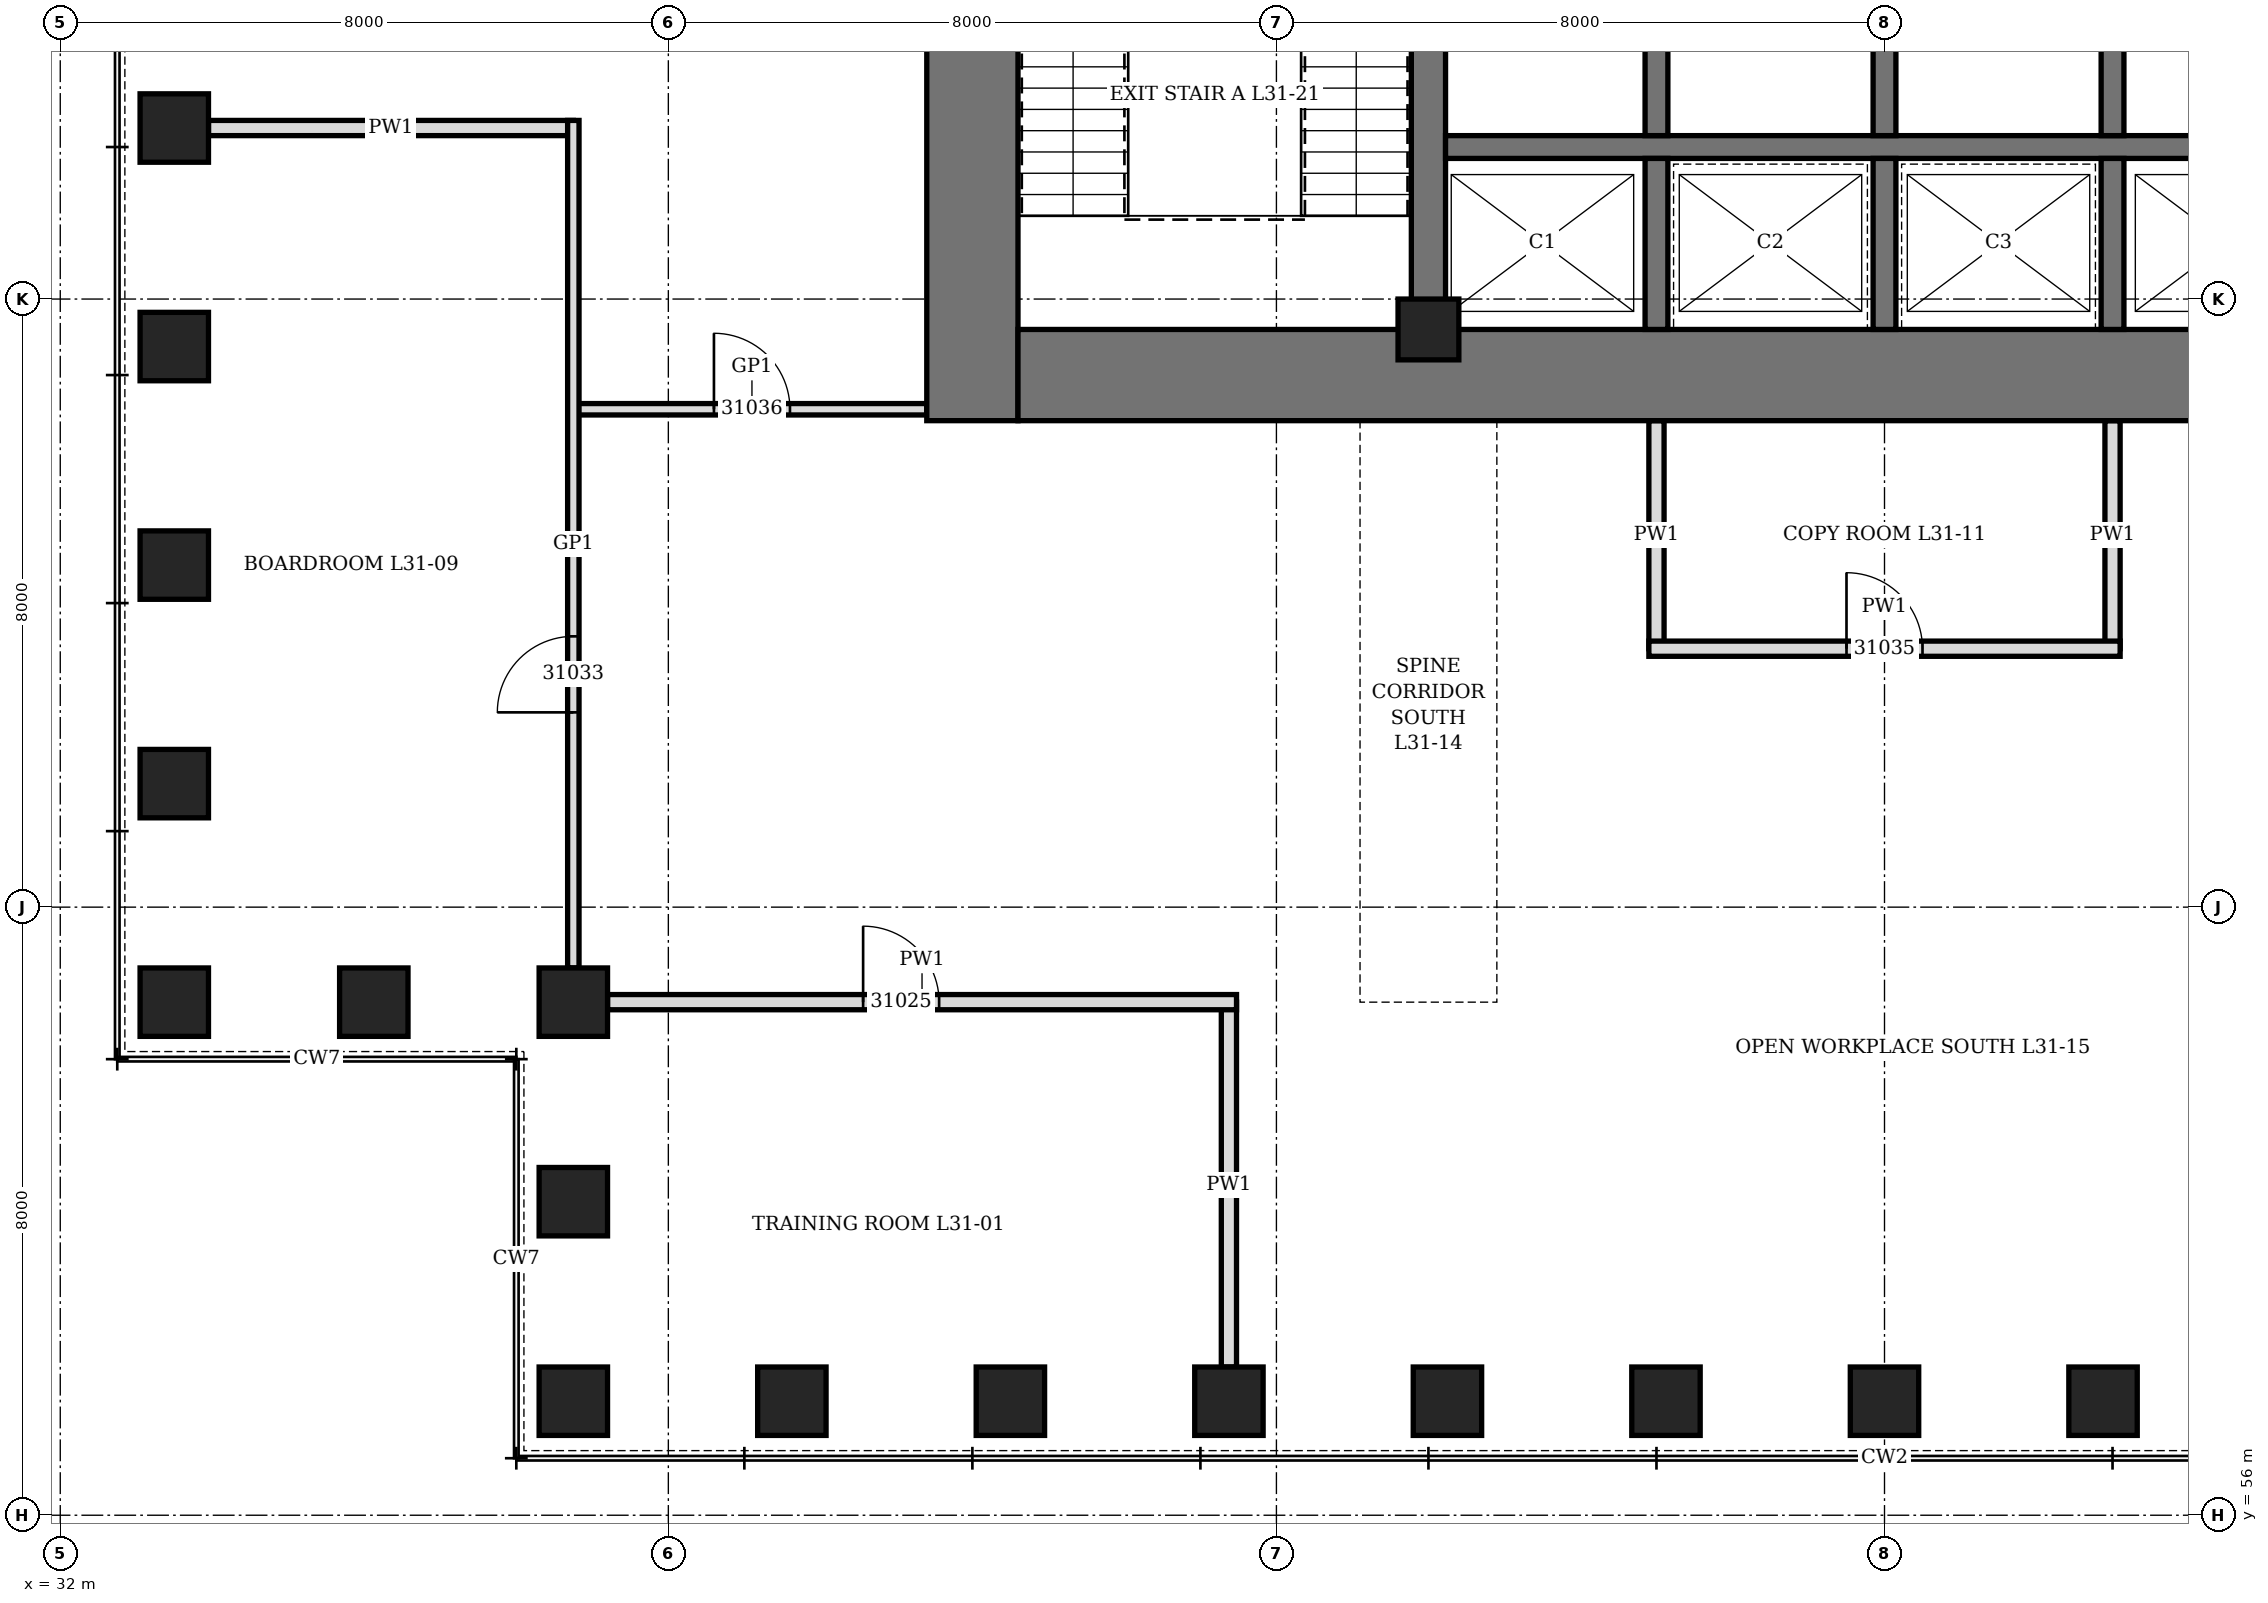
"""IFC4 building model, lengths in metres.
Left out: names, types, materials, properties, quantities, classifications, styles, units other than length and angle.
Written with IfcOpenShell. Run it as: python <this file> out.ifc"""

import sys

from ifc_helpers import new_model, si_unit, direction, frame, frame_2d, origin, origin_2d, place, context, subcontext, project, spatial, rectangle, hollow_rectangle, extrude, element, fill, save


model = new_model("IFC4")
c1 = context("Model", 3, precision=1e-05, world=origin(), true_north=direction((0.0, 1.0)))
c2 = subcontext(c1, "Body", "Model", "MODEL_VIEW")
j1 = project(units=[si_unit("LENGTHUNIT", "METRE"), si_unit("PLANEANGLEUNIT", "RADIAN")], contexts=[c1])
p1 = place(None, origin())
s1 = spatial("IfcSite", under=j1, at=p1, CompositionType="ELEMENT")
p2 = place(p1, origin())
s2 = spatial("IfcBuilding", under=s1, at=p2, CompositionType="ELEMENT")
p3 = place(p2, frame((0.0, 0.0, 141.7)))
s3 = spatial("IfcBuildingStorey", under=s2, at=p3, CompositionType="ELEMENT", Elevation=141.7)
for number, where, z_axis, x_axis in (
    (1, (38.75, 57.5, 0.0), (0.0, 0.0, 1.0), (1.0, 0.0, 0.0)),
    (2, (41.625, 57.5, 0.0), (0.0, 0.0, 1.0), (1.0, 0.0, 0.0)),
    (3, (44.5, 57.5, 0.0), (0.0, 0.0, 1.0), (1.0, 0.0, 0.0)),
    (4, (47.375, 57.5, 0.0), (0.0, 0.0, 1.0), (1.0, 0.0, 0.0)),
    (5, (50.25, 57.5, 0.0), (0.0, 0.0, 1.0), (1.0, 0.0, 0.0)),
    (6, (53.125, 57.5, 0.0), (0.0, 0.0, 1.0), (1.0, 0.0, 0.0)),
    (7, (56.0, 57.5, 0.0), (0.0, 0.0, 1.0), (1.0, 0.0, 0.0)),
    (8, (58.875, 57.5, 0.0), (0.0, 0.0, 1.0), (1.0, 0.0, 0.0)),
    (9, (33.5, 74.25, 0.0), (0.0, 0.0, 1.0), (0.0, 1.0, 0.0)),
    (10, (33.5, 71.375, 0.0), (0.0, 0.0, 1.0), (0.0, 1.0, 0.0)),
    (11, (33.5, 68.5, 0.0), (0.0, 0.0, 1.0), (0.0, 1.0, 0.0)),
    (12, (33.5, 65.625, 0.0), (0.0, 0.0, 1.0), (0.0, 1.0, 0.0)),
    (13, (33.5, 62.75, 0.0), (0.0, 0.0, 1.0), (1.0, 0.0, 0.0)),
    (14, (36.125, 62.75, 0.0), (0.0, 0.0, 1.0), (1.0, 0.0, 0.0)),
    (15, (38.75, 62.75, 0.0), (0.0, 0.0, 1.0), (0.0, 1.0, 0.0)),
    (16, (38.75, 60.125, 0.0), (0.0, 0.0, 1.0), (0.0, 1.0, 0.0)),
):
    element("IfcColumn", number, at=place(p3, frame(where, z_axis=z_axis, x_axis=x_axis)), inside=s3, PredefinedType="COLUMN", context=c2, shape_type="SweptSolid", body=[
        extrude(hollow_rectangle(XDim=0.9, YDim=0.9, WallThickness=0.12, at=origin_2d()), origin(), (0.0, 0.0, 1.0), 4.2),
    ])
p4 = place(p3, frame((44.0, 70.4, 0.0), z_axis=(0.0, 0.0, 1.0), x_axis=(0.0, 1.0, 0.0)))
e17 = element("IfcWall", 17, at=p4, inside=s3, PredefinedType="SHEAR", context=c2, shape_type="SweptSolid", body=[
    extrude(rectangle(XDim=19.2, YDim=1.2, at=frame_2d((9.6, 0.0))), origin(), (0.0, 0.0, 1.0), 4.2),
])
p5 = place(p4, frame((8.6, 0.0, 0.0)))
e18 = element("IfcOpeningElement", 18, at=p5, cuts=e17, PredefinedType="OPENING", context=c2, shape_type="SweptSolid", body=[
    extrude(rectangle(XDim=2.0, YDim=2.4, at=frame_2d((1.0, 1.2))), frame((0.0, 0.61, 0.0), z_axis=(0.0, -1.0, 0.0), x_axis=(1.0, 0.0, 0.0)), (0.0, 0.0, 1.0), 1.22),
])
p6 = place(p3, frame((44.6, 71.0, 0.0), z_axis=(0.0, 0.0, 1.0), x_axis=(1.0, 0.0, 0.0)))
e19 = element("IfcWall", 19, at=p6, inside=s3, PredefinedType="SHEAR", context=c2, shape_type="SweptSolid", body=[
    extrude(rectangle(XDim=22.8, YDim=1.2, at=frame_2d((11.4, 0.0))), origin(), (0.0, 0.0, 1.0), 4.2),
])
p7 = place(p3, frame((50.0, 71.6, 0.0), z_axis=(0.0, 0.0, 1.0), x_axis=(0.0, 1.0, 0.0)))
e20 = element("IfcWall", 20, at=p7, inside=s3, PredefinedType="SHEAR", context=c2, shape_type="SweptSolid", body=[
    extrude(rectangle(XDim=16.8, YDim=0.45, at=frame_2d((8.4, 0.0))), origin(), (0.0, 0.0, 1.0), 4.2),
])
p8 = place(p7, frame((7.5, 0.0, 0.0)))
e21 = element("IfcOpeningElement", 21, at=p8, cuts=e20, PredefinedType="OPENING", context=c2, shape_type="SweptSolid", body=[
    extrude(rectangle(XDim=1.8, YDim=2.4, at=frame_2d((0.9, 1.2))), frame((0.0, 0.235, 0.0), z_axis=(0.0, -1.0, 0.0), x_axis=(1.0, 0.0, 0.0)), (0.0, 0.0, 1.0), 0.47),
])
p9 = place(p3, frame((50.225, 74.0, 0.0), z_axis=(0.0, 0.0, 1.0), x_axis=(1.0, 0.0, 0.0)))
e22 = element("IfcWall", 22, at=p9, inside=s3, PredefinedType="SHEAR", context=c2, shape_type="SweptSolid", body=[
    extrude(rectangle(XDim=11.55, YDim=0.3, at=frame_2d((5.775, 0.0))), origin(), (0.0, 0.0, 1.0), 4.2),
])
p10 = place(p3, frame((53.0, 71.6, 0.0), z_axis=(0.0, 0.0, 1.0), x_axis=(0.0, 1.0, 0.0)))
e23 = element("IfcWall", 23, at=p10, inside=s3, PredefinedType="SHEAR", context=c2, shape_type="SweptSolid", body=[
    extrude(rectangle(XDim=2.25, YDim=0.3, at=frame_2d((1.125, 0.0))), origin(), (0.0, 0.0, 1.0), 4.2),
])
p11 = place(p3, frame((53.0, 74.15, 0.0), z_axis=(0.0, 0.0, 1.0), x_axis=(0.0, 1.0, 0.0)))
e24 = element("IfcWall", 24, at=p11, inside=s3, PredefinedType="SHEAR", context=c2, shape_type="SweptSolid", body=[
    extrude(rectangle(XDim=3.625, YDim=0.3, at=frame_2d((1.812, 0.0))), origin(), (0.0, 0.0, 1.0), 4.2),
])
p12 = place(p3, frame((56.0, 71.6, 0.0), z_axis=(0.0, 0.0, 1.0), x_axis=(0.0, 1.0, 0.0)))
e25 = element("IfcWall", 25, at=p12, inside=s3, PredefinedType="SHEAR", context=c2, shape_type="SweptSolid", body=[
    extrude(rectangle(XDim=2.25, YDim=0.3, at=frame_2d((1.125, 0.0))), origin(), (0.0, 0.0, 1.0), 4.2),
])
p13 = place(p3, frame((56.0, 74.15, 0.0), z_axis=(0.0, 0.0, 1.0), x_axis=(0.0, 1.0, 0.0)))
e26 = element("IfcWall", 26, at=p13, inside=s3, PredefinedType="SHEAR", context=c2, shape_type="SweptSolid", body=[
    extrude(rectangle(XDim=3.625, YDim=0.3, at=frame_2d((1.812, 0.0))), origin(), (0.0, 0.0, 1.0), 4.2),
])
p14 = place(p3, frame((59.0, 71.6, 0.0), z_axis=(0.0, 0.0, 1.0), x_axis=(0.0, 1.0, 0.0)))
e27 = element("IfcWall", 27, at=p14, inside=s3, PredefinedType="SHEAR", context=c2, shape_type="SweptSolid", body=[
    extrude(rectangle(XDim=2.25, YDim=0.3, at=frame_2d((1.125, 0.0))), origin(), (0.0, 0.0, 1.0), 4.2),
])
p15 = place(p3, frame((59.0, 74.15, 0.0), z_axis=(0.0, 0.0, 1.0), x_axis=(0.0, 1.0, 0.0)))
e28 = element("IfcWall", 28, at=p15, inside=s3, PredefinedType="SHEAR", context=c2, shape_type="SweptSolid", body=[
    extrude(rectangle(XDim=3.625, YDim=0.3, at=frame_2d((1.812, 0.0))), origin(), (0.0, 0.0, 1.0), 4.2),
])
p16 = place(p3, frame((50.0, 71.6, 0.0), z_axis=(0.0, 0.0, 1.0), x_axis=(1.0, 0.0, 0.0)))
e29 = element("IfcColumn", 29, at=p16, inside=s3, PredefinedType="COLUMN", context=c2, shape_type="SweptSolid", body=[
    extrude(hollow_rectangle(XDim=0.8, YDim=0.8, WallThickness=0.1, at=origin_2d()), origin(), (0.0, 0.0, 1.0), 4.2),
])
p17 = place(p3, frame((47.375, 57.95, 0.0), z_axis=(0.0, 0.0, 1.0), x_axis=(0.0, 1.0, 0.0)))
e30 = element("IfcWall", 30, at=p17, inside=s3, PredefinedType="PARTITIONING", context=c2, shape_type="SweptSolid", body=[
    extrude(rectangle(XDim=4.8, YDim=0.2, at=frame_2d((2.4, 0.0))), origin(), (0.0, 0.0, 1.0), 3.278),
])
p18 = place(p3, frame((33.95, 74.25, 0.0), z_axis=(0.0, 0.0, 1.0), x_axis=(1.0, 0.0, 0.0)))
e31 = element("IfcWall", 31, at=p18, inside=s3, PredefinedType="PARTITIONING", context=c2, shape_type="SweptSolid", body=[
    extrude(rectangle(XDim=4.8, YDim=0.2, at=frame_2d((2.4, 0.0))), origin(), (0.0, 0.0, 1.0), 3.428),
])
for number, where, z_axis, x_axis in (
    (32, (53.0, 67.4, 0.0), (0.0, 0.0, 1.0), (0.0, 1.0, 0.0)),
    (33, (59.0, 67.4, 0.0), (0.0, 0.0, 1.0), (0.0, 1.0, 0.0)),
):
    element("IfcWall", number, at=place(p3, frame(where, z_axis=z_axis, x_axis=x_axis)), inside=s3, PredefinedType="PARTITIONING", context=c2, shape_type="SweptSolid", body=[
        extrude(rectangle(XDim=3.0, YDim=0.2, at=frame_2d((1.5, 0.0))), origin(), (0.0, 0.0, 1.0), 3.278),
    ])
p19 = place(p3, frame((39.2, 62.75, 0.0), z_axis=(0.0, 0.0, 1.0), x_axis=(1.0, 0.0, 0.0)))
e34 = element("IfcWall", 34, at=p19, inside=s3, PredefinedType="PARTITIONING", context=c2, shape_type="SweptSolid", body=[
    extrude(rectangle(XDim=8.275, YDim=0.2, at=frame_2d((4.138, 0.0))), origin(), (0.0, 0.0, 1.0), 4.04),
])
p20 = place(p19, frame((3.363, 0.0, 0.0)))
e35 = element("IfcOpeningElement", 35, at=p20, cuts=e34, PredefinedType="OPENING", context=c2, shape_type="SweptSolid", body=[
    extrude(rectangle(XDim=1.0, YDim=2.1, at=frame_2d((0.5, 1.05))), frame((0.0, 0.11, 0.0), z_axis=(0.0, -1.0, 0.0), x_axis=(1.0, 0.0, 0.0)), (0.0, 0.0, 1.0), 0.22),
])
p21 = place(p3, frame((52.9, 67.4, 0.0), z_axis=(0.0, 0.0, 1.0), x_axis=(1.0, 0.0, 0.0)))
e36 = element("IfcWall", 36, at=p21, inside=s3, PredefinedType="PARTITIONING", context=c2, shape_type="SweptSolid", body=[
    extrude(rectangle(XDim=6.2, YDim=0.2, at=frame_2d((3.1, 0.0))), origin(), (0.0, 0.0, 1.0), 4.04),
])
p22 = place(p21, frame((2.6, 0.0, 0.0)))
e37 = element("IfcOpeningElement", 37, at=p22, cuts=e36, PredefinedType="OPENING", context=c2, shape_type="SweptSolid", body=[
    extrude(rectangle(XDim=1.0, YDim=2.1, at=frame_2d((0.5, 1.05))), frame((0.0, 0.11, 0.0), z_axis=(0.0, -1.0, 0.0), x_axis=(1.0, 0.0, 0.0)), (0.0, 0.0, 1.0), 0.22),
])
p23 = place(p3, frame((38.8, 70.55, 0.0), z_axis=(0.0, 0.0, 1.0), x_axis=(1.0, 0.0, 0.0)))
e38 = element("IfcWall", 38, at=p23, inside=s3, PredefinedType="PARTITIONING", context=c2, shape_type="SweptSolid", body=[
    extrude(rectangle(XDim=4.6, YDim=0.15, at=frame_2d((2.3, 0.0))), origin(), (0.0, 0.0, 1.0), 4.04),
])
p24 = place(p23, frame((1.8, 0.0, 0.0)))
e39 = element("IfcOpeningElement", 39, at=p24, cuts=e38, PredefinedType="OPENING", context=c2, shape_type="SweptSolid", body=[
    extrude(rectangle(XDim=1.0, YDim=2.4, at=frame_2d((0.5, 1.2))), frame((0.0, 0.085, 0.0), z_axis=(0.0, -1.0, 0.0), x_axis=(1.0, 0.0, 0.0)), (0.0, 0.0, 1.0), 0.17),
])
p25 = place(p3, frame((38.75, 63.2, 0.0), z_axis=(0.0, 0.0, 1.0), x_axis=(0.0, 1.0, 0.0)))
e40 = element("IfcWall", 40, at=p25, inside=s3, PredefinedType="PARTITIONING", context=c2, shape_type="SweptSolid", body=[
    extrude(rectangle(XDim=11.15, YDim=0.15, at=frame_2d((5.575, 0.0))), origin(), (0.0, 0.0, 1.0), 4.04),
])
p26 = place(p25, frame((3.363, 0.0, 0.0)))
e41 = element("IfcOpeningElement", 41, at=p26, cuts=e40, PredefinedType="OPENING", context=c2, shape_type="SweptSolid", body=[
    extrude(rectangle(XDim=1.0, YDim=2.4, at=frame_2d((0.5, 1.2))), frame((0.0, 0.085, 0.0), z_axis=(0.0, -1.0, 0.0), x_axis=(1.0, 0.0, 0.0)), (0.0, 0.0, 1.0), 0.17),
])
p27 = place(p20, origin())
e42 = element("IfcDoor", 42, at=p27, inside=s3, OperationType="SINGLE_SWING_LEFT", PredefinedType="DOOR", context=c2, shape_type="SweptSolid", body=[
    extrude(rectangle(XDim=1.0, YDim=2.1, at=frame_2d((0.5, 1.05))), frame((0.0, 0.1, 0.0), z_axis=(0.0, -1.0, 0.0), x_axis=(1.0, 0.0, 0.0)), (0.0, 0.0, 1.0), 0.199),
])
fill(e35, e42)
p28 = place(p26, origin())
e43 = element("IfcDoor", 43, at=p28, inside=s3, OperationType="SINGLE_SWING_RIGHT", PredefinedType="DOOR", context=c2, shape_type="SweptSolid", body=[
    extrude(rectangle(XDim=1.0, YDim=2.4, at=frame_2d((0.5, 1.2))), frame((0.0, 0.075, 0.0), z_axis=(0.0, -1.0, 0.0), x_axis=(1.0, 0.0, 0.0)), (0.0, 0.0, 1.0), 0.149),
])
fill(e41, e43)
p29 = place(p22, origin())
e44 = element("IfcDoor", 44, at=p29, inside=s3, OperationType="SINGLE_SWING_LEFT", PredefinedType="DOOR", context=c2, shape_type="SweptSolid", body=[
    extrude(rectangle(XDim=1.0, YDim=2.1, at=frame_2d((0.5, 1.05))), frame((0.0, 0.1, 0.0), z_axis=(0.0, -1.0, 0.0), x_axis=(1.0, 0.0, 0.0)), (0.0, 0.0, 1.0), 0.199),
])
fill(e37, e44)
p30 = place(p24, origin())
e45 = element("IfcDoor", 45, at=p30, inside=s3, OperationType="SINGLE_SWING_RIGHT", PredefinedType="DOOR", context=c2, shape_type="SweptSolid", body=[
    extrude(rectangle(XDim=1.0, YDim=2.4, at=frame_2d((0.5, 1.2))), frame((0.0, 0.075, 0.0), z_axis=(0.0, -1.0, 0.0), x_axis=(1.0, 0.0, 0.0)), (0.0, 0.0, 1.0), 0.149),
])
fill(e39, e45)
save(model, sys.argv[1])
